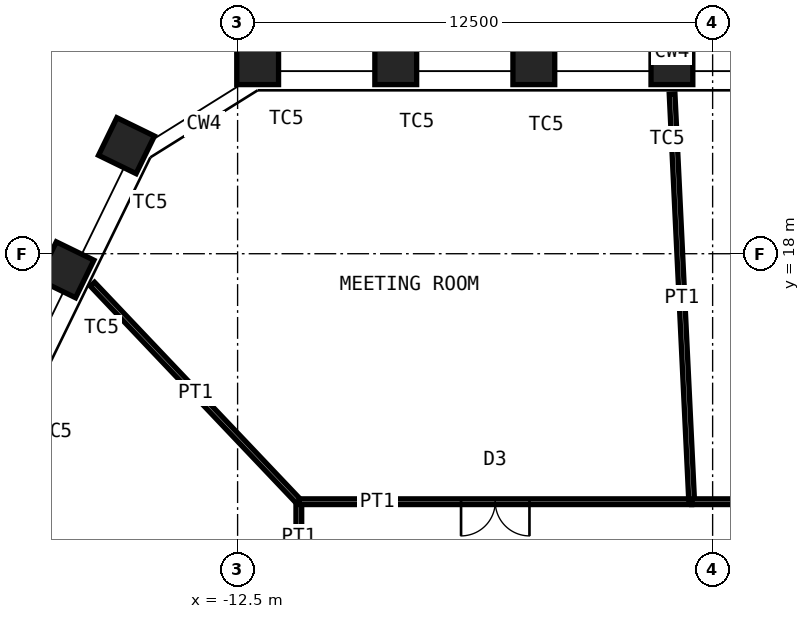
"""IFC4 building model, lengths in metres.
Left out: names, types, materials, properties, quantities, classifications, styles, units other than length and angle.
Written with IfcOpenShell. Run it as: python <this file> out.ifc"""

import sys

from ifc_helpers import new_model, si_unit, direction, frame, frame_2d, origin, origin_2d, place, context, subcontext, project, spatial, rectangle, hollow_rectangle, extrude, element, fill, save


model = new_model("IFC4")
c1 = context("Model", 3, precision=1e-05, world=origin(), true_north=direction((0.0, 1.0)))
c2 = subcontext(c1, "Body", "Model", "MODEL_VIEW")
j1 = project(units=[si_unit("LENGTHUNIT", "METRE"), si_unit("PLANEANGLEUNIT", "RADIAN")], contexts=[c1])
p1 = place(None, origin())
s1 = spatial("IfcSite", under=j1, at=p1, CompositionType="ELEMENT")
p2 = place(p1, origin())
s2 = spatial("IfcBuilding", under=s1, at=p2, CompositionType="ELEMENT")
p3 = place(p2, frame((0.0, 0.0, 214.0)))
s3 = spatial("IfcBuildingStorey", under=s2, at=p3, CompositionType="ELEMENT", Elevation=214.0)
for number, where, z_axis, x_axis in (
    (1, (-11.972, 23.0, 0.0), (0.0, 0.0, 1.0), (-1.0, 0.0, 0.0)),
    (2, (-8.338, 23.0, 0.0), (0.0, 0.0, 1.0), (-1.0, 0.0, 0.0)),
    (3, (-4.705, 23.0, 0.0), (0.0, 0.0, 1.0), (-1.0, 0.0, 0.0)),
    (4, (-1.071, 23.0, 0.0), (0.0, 0.0, 1.0), (-1.0, 0.0, 0.0)),
    (5, (-17.017, 17.577, 0.0), (0.0, 0.0, 1.0), (-0.438, -0.899, 0.0)),
    (6, (-15.424, 20.843, 0.0), (0.0, 0.0, 1.0), (-0.438, -0.899, 0.0)),
):
    element("IfcColumn", number, at=place(p3, frame(where, z_axis=z_axis, x_axis=x_axis)), inside=s3, PredefinedType="COLUMN", context=c2, shape_type="SweptSolid", body=[
        extrude(hollow_rectangle(XDim=1.1, YDim=1.1, WallThickness=0.07, at=origin_2d()), origin(), (0.0, 0.0, 1.0), 4.2),
    ])
p4 = place(p3, frame((-10.889, 9.6, 0.0), z_axis=(0.0, 0.0, 1.0), x_axis=(0.0, 1.0, 0.0)))
e7 = element("IfcWall", 7, at=p4, inside=s3, PredefinedType="PARTITIONING", context=c2, shape_type="SweptSolid", body=[
    extrude(rectangle(XDim=1.875, YDim=0.15, at=frame_2d((0.938, 0.0))), origin(), (0.0, 0.0, 1.0), 4.03),
])
p5 = place(p3, frame((-16.319, 17.198, 0.0), z_axis=(0.0, 0.0, 1.0), x_axis=(0.688326413955, -0.725401094466, 0.0)))
e8 = element("IfcWall", 8, at=p5, inside=s3, PredefinedType="PARTITIONING", context=c2, shape_type="SweptSolid", body=[
    extrude(rectangle(XDim=7.889, YDim=0.15, at=frame_2d((3.944, 0.0))), origin(), (0.0, 0.0, 1.0), 4.03),
])
p6 = place(p3, frame((-10.889, 11.475, 0.0), z_axis=(0.0, 0.0, 1.0), x_axis=(1.0, 0.0, 0.0)))
e9 = element("IfcWall", 9, at=p6, inside=s3, PredefinedType="PARTITIONING", context=c2, shape_type="SweptSolid", body=[
    extrude(rectangle(XDim=10.337, YDim=0.15, at=frame_2d((5.169, 0.0))), origin(), (0.0, 0.0, 1.0), 4.03),
])
p7 = place(p6, frame((4.269, 0.0, 0.0)))
e10 = element("IfcOpeningElement", 10, at=p7, cuts=e9, PredefinedType="OPENING", context=c2, shape_type="SweptSolid", body=[
    extrude(rectangle(XDim=1.8, YDim=2.4, at=frame_2d((0.9, 1.2))), frame((0.0, 0.085, 0.0), z_axis=(0.0, -1.0, 0.0), x_axis=(1.0, 0.0, 0.0)), (0.0, 0.0, 1.0), 0.17),
])
p8 = place(p3, frame((-1.067, 22.2, 0.0), z_axis=(0.0, 0.0, 1.0), x_axis=(0.047998335863, -0.998847415652, 0.0)))
e11 = element("IfcWall", 11, at=p8, inside=s3, PredefinedType="PARTITIONING", context=c2, shape_type="SweptSolid", body=[
    extrude(rectangle(XDim=10.738, YDim=0.15, at=frame_2d((5.369, 0.0))), origin(), (0.0, 0.0, 1.0), 3.43),
])
p9 = place(p3, frame((-0.551, 11.475, 0.0), z_axis=(0.0, 0.0, 1.0), x_axis=(1.0, 0.0, 0.0)))
e12 = element("IfcWall", 12, at=p9, inside=s3, PredefinedType="PARTITIONING", context=c2, shape_type="SweptSolid", body=[
    extrude(rectangle(XDim=3.74, YDim=0.15, at=frame_2d((1.87, 0.0))), origin(), (0.0, 0.0, 1.0), 4.03),
])
p10 = place(p9, frame((1.37, 0.0, 0.0)))
e13 = element("IfcOpeningElement", 13, at=p10, cuts=e12, PredefinedType="OPENING", context=c2, shape_type="SweptSolid", body=[
    extrude(rectangle(XDim=1.0, YDim=2.4, at=frame_2d((0.5, 1.2))), frame((0.0, 0.085, 0.0), z_axis=(0.0, -1.0, 0.0), x_axis=(1.0, 0.0, 0.0)), (0.0, 0.0, 1.0), 0.17),
])
p11 = place(p7, origin())
e14 = element("IfcDoor", 14, at=p11, inside=s3, OperationType="DOUBLE_DOOR_DOUBLE_SWING", PredefinedType="DOOR", context=c2, shape_type="SweptSolid", body=[
    extrude(rectangle(XDim=1.8, YDim=2.4, at=frame_2d((0.9, 1.2))), frame((0.0, 0.025, 0.0), z_axis=(0.0, -1.0, 0.0), x_axis=(1.0, 0.0, 0.0)), (0.0, 0.0, 1.0), 0.05),
])
fill(e10, e14)
save(model, sys.argv[1])
